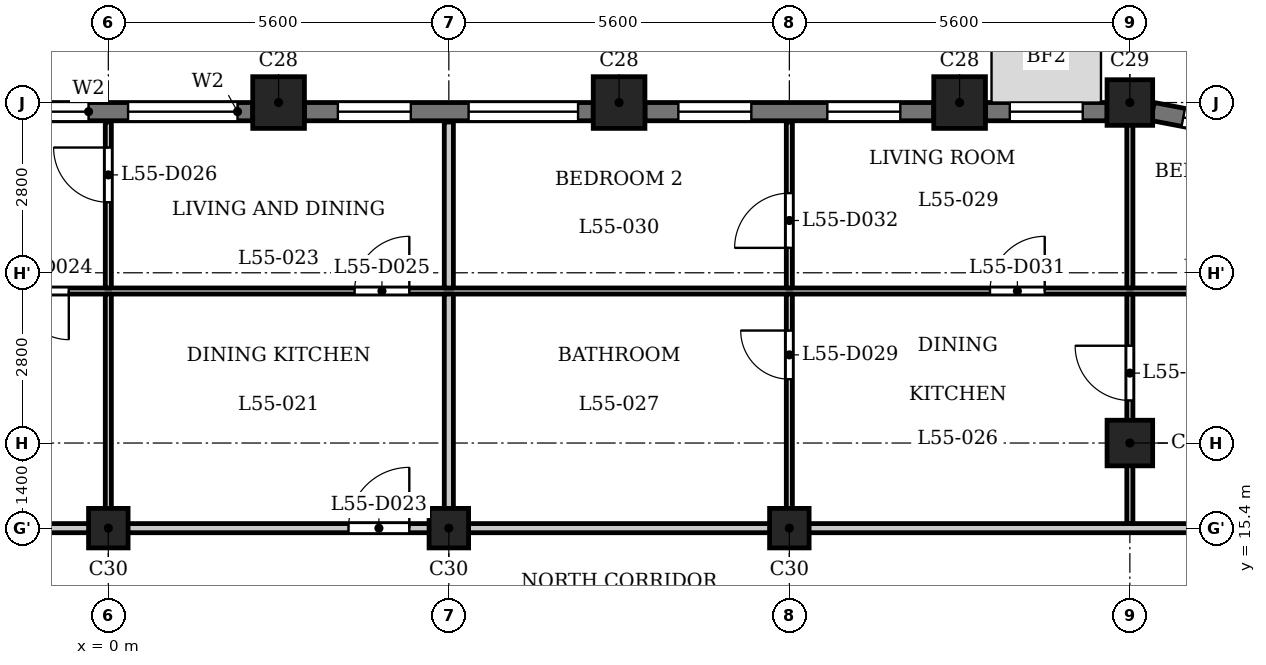
"""IFC4 building model, lengths in metres.
Left out: names, types, materials, properties, quantities, classifications, styles, units other than length and angle.
Written with IfcOpenShell. Run it as: python <this file> out.ifc"""

import sys

from ifc_helpers import new_model, si_unit, direction, frame, frame_2d, origin, origin_2d, place, context, subcontext, project, spatial, rectangle, extrude, element, fill, save


model = new_model("IFC4")
c1 = context("Model", 3, precision=1e-05, world=origin(), true_north=direction((0.0, 1.0)))
c2 = subcontext(c1, "Body", "Model", "MODEL_VIEW")
j1 = project(units=[si_unit("LENGTHUNIT", "METRE"), si_unit("PLANEANGLEUNIT", "RADIAN")], contexts=[c1])
p1 = place(None, origin())
s1 = spatial("IfcSite", under=j1, at=p1, CompositionType="ELEMENT")
p2 = place(p1, origin())
s2 = spatial("IfcBuilding", under=s1, at=p2, CompositionType="ELEMENT")
p3 = place(p2, frame((0.0, 0.0, 213.4)))
s3 = spatial("IfcBuildingStorey", under=s2, at=p3, CompositionType="ELEMENT", Elevation=213.4)
for number, where, z_axis, x_axis in (
    (1, (14.0, 22.4, 0.0), (0.0, 0.0, 1.0), (1.0, 0.0, 0.0)),
    (2, (8.4, 22.4, 0.0), (0.0, 0.0, 1.0), (1.0, 0.0, 0.0)),
    (3, (2.8, 22.4, 0.0), (0.0, 0.0, 1.0), (1.0, 0.0, 0.0)),
):
    element("IfcColumn", number, at=place(p3, frame(where, z_axis=z_axis, x_axis=x_axis)), inside=s3, PredefinedType="COLUMN", context=c2, shape_type="SweptSolid", body=[
        extrude(rectangle(XDim=0.85, YDim=0.85, at=origin_2d()), origin(), (0.0, 0.0, 1.0), 3.5),
    ])
for number, where, z_axis, x_axis in (
    (4, (16.8, 16.8, 0.0), (0.0, 0.0, 1.0), (1.0, 0.0, 0.0)),
    (5, (16.8, 22.4, 0.0), (0.0, 0.0, 1.0), (1.0, 0.0, 0.0)),
):
    element("IfcColumn", number, at=place(p3, frame(where, z_axis=z_axis, x_axis=x_axis)), inside=s3, PredefinedType="COLUMN", context=c2, shape_type="SweptSolid", body=[
        extrude(rectangle(XDim=0.75, YDim=0.75, at=origin_2d()), origin(), (0.0, 0.0, 1.0), 3.5),
    ])
for number, where, z_axis, x_axis in (
    (6, (0.0, 15.4, 0.0), (0.0, 0.0, 1.0), (1.0, 0.0, 0.0)),
    (7, (5.6, 15.4, 0.0), (0.0, 0.0, 1.0), (1.0, 0.0, 0.0)),
    (8, (11.2, 15.4, 0.0), (0.0, 0.0, 1.0), (1.0, 0.0, 0.0)),
):
    element("IfcColumn", number, at=place(p3, frame(where, z_axis=z_axis, x_axis=x_axis)), inside=s3, PredefinedType="COLUMN", context=c2, shape_type="SweptSolid", body=[
        extrude(rectangle(XDim=0.65, YDim=0.65, at=origin_2d()), origin(), (0.0, 0.0, 1.0), 3.5),
    ])
p4 = place(p3, frame((18.971, 21.91, 0.0), z_axis=(0.0, 0.0, 1.0), x_axis=(-0.982300037503, 0.187314271538, 0.0)))
e9 = element("IfcWall", 9, at=p4, inside=s3, PredefinedType="SOLIDWALL", context=c2, shape_type="SweptSolid", body=[
    extrude(rectangle(XDim=1.831, YDim=0.3, at=frame_2d((0.916, 0.0))), origin(), (0.0, 0.0, 1.0), 2.5),
])
p5 = place(p4, frame((0.516, 0.0, 0.6)))
e10 = element("IfcOpeningElement", 10, at=p5, cuts=e9, PredefinedType="OPENING", context=c2, shape_type="SweptSolid", body=[
    extrude(rectangle(XDim=0.8, YDim=1.55, at=frame_2d((0.4, 0.775))), frame((0.0, 0.16, 0.0), z_axis=(0.0, -1.0, 0.0), x_axis=(1.0, 0.0, 0.0)), (0.0, 0.0, 1.0), 0.32),
])
p6 = place(p3, frame((16.425, 22.25, 0.0), z_axis=(0.0, 0.0, 1.0), x_axis=(-1.0, 0.0, 0.0)))
e11 = element("IfcWall", 11, at=p6, inside=s3, PredefinedType="SOLIDWALL", context=c2, shape_type="SweptSolid", body=[
    extrude(rectangle(XDim=2.0, YDim=0.3, at=frame_2d((1.0, 0.0))), origin(), (0.0, 0.0, 1.0), 2.5),
])
p7 = place(p6, frame((0.4, 0.0, 0.6)))
e12 = element("IfcOpeningElement", 12, at=p7, cuts=e11, PredefinedType="OPENING", context=c2, shape_type="SweptSolid", body=[
    extrude(rectangle(XDim=1.2, YDim=1.55, at=frame_2d((0.6, 0.775))), frame((0.0, 0.16, 0.0), z_axis=(0.0, -1.0, 0.0), x_axis=(1.0, 0.0, 0.0)), (0.0, 0.0, 1.0), 0.32),
])
p8 = place(p3, frame((13.575, 22.25, 0.0), z_axis=(0.0, 0.0, 1.0), x_axis=(-1.0, 0.0, 0.0)))
e13 = element("IfcWall", 13, at=p8, inside=s3, PredefinedType="SOLIDWALL", context=c2, shape_type="SweptSolid", body=[
    extrude(rectangle(XDim=4.75, YDim=0.3, at=frame_2d((2.375, 0.0))), origin(), (0.0, 0.0, 1.0), 2.5),
])
p9 = place(p8, frame((0.55, 0.0, 0.6)))
e14 = element("IfcOpeningElement", 14, at=p9, cuts=e13, PredefinedType="OPENING", context=c2, shape_type="SweptSolid", body=[
    extrude(rectangle(XDim=1.2, YDim=1.55, at=frame_2d((0.6, 0.775))), frame((0.0, 0.16, 0.0), z_axis=(0.0, -1.0, 0.0), x_axis=(1.0, 0.0, 0.0)), (0.0, 0.0, 1.0), 0.32),
])
p10 = place(p8, frame((3.0, 0.0, 0.6)))
e15 = element("IfcOpeningElement", 15, at=p10, cuts=e13, PredefinedType="OPENING", context=c2, shape_type="SweptSolid", body=[
    extrude(rectangle(XDim=1.2, YDim=1.55, at=frame_2d((0.6, 0.775))), frame((0.0, 0.16, 0.0), z_axis=(0.0, -1.0, 0.0), x_axis=(1.0, 0.0, 0.0)), (0.0, 0.0, 1.0), 0.32),
])
p11 = place(p3, frame((7.975, 22.25, 0.0), z_axis=(0.0, 0.0, 1.0), x_axis=(-1.0, 0.0, 0.0)))
e16 = element("IfcWall", 16, at=p11, inside=s3, PredefinedType="SOLIDWALL", context=c2, shape_type="SweptSolid", body=[
    extrude(rectangle(XDim=4.75, YDim=0.3, at=frame_2d((2.375, 0.0))), origin(), (0.0, 0.0, 1.0), 2.5),
])
p12 = place(p11, frame((0.25, 0.0, 0.9)))
e17 = element("IfcOpeningElement", 17, at=p12, cuts=e16, PredefinedType="OPENING", context=c2, shape_type="SweptSolid", body=[
    extrude(rectangle(XDim=1.8, YDim=1.25, at=frame_2d((0.9, 0.625))), frame((0.0, 0.16, 0.0), z_axis=(0.0, -1.0, 0.0), x_axis=(1.0, 0.0, 0.0)), (0.0, 0.0, 1.0), 0.32),
])
p13 = place(p11, frame((3.0, 0.0, 0.6)))
e18 = element("IfcOpeningElement", 18, at=p13, cuts=e16, PredefinedType="OPENING", context=c2, shape_type="SweptSolid", body=[
    extrude(rectangle(XDim=1.2, YDim=1.55, at=frame_2d((0.6, 0.775))), frame((0.0, 0.16, 0.0), z_axis=(0.0, -1.0, 0.0), x_axis=(1.0, 0.0, 0.0)), (0.0, 0.0, 1.0), 0.32),
])
p14 = place(p3, frame((2.375, 22.25, 0.0), z_axis=(0.0, 0.0, 1.0), x_axis=(-1.0, 0.0, 0.0)))
e19 = element("IfcWall", 19, at=p14, inside=s3, PredefinedType="SOLIDWALL", context=c2, shape_type="SweptSolid", body=[
    extrude(rectangle(XDim=4.75, YDim=0.3, at=frame_2d((2.375, 0.0))), origin(), (0.0, 0.0, 1.0), 2.5),
])
p15 = place(p14, frame((0.25, 0.0, 0.9)))
e20 = element("IfcOpeningElement", 20, at=p15, cuts=e19, PredefinedType="OPENING", context=c2, shape_type="SweptSolid", body=[
    extrude(rectangle(XDim=1.8, YDim=1.25, at=frame_2d((0.9, 0.625))), frame((0.0, 0.16, 0.0), z_axis=(0.0, -1.0, 0.0), x_axis=(1.0, 0.0, 0.0)), (0.0, 0.0, 1.0), 0.32),
])
p16 = place(p14, frame((2.7, 0.0, 0.9)))
e21 = element("IfcOpeningElement", 21, at=p16, cuts=e19, PredefinedType="OPENING", context=c2, shape_type="SweptSolid", body=[
    extrude(rectangle(XDim=1.8, YDim=1.25, at=frame_2d((0.9, 0.625))), frame((0.0, 0.16, 0.0), z_axis=(0.0, -1.0, 0.0), x_axis=(1.0, 0.0, 0.0)), (0.0, 0.0, 1.0), 0.32),
])
p17 = place(p3, frame((-24.684, 15.4, 0.0), z_axis=(0.0, 0.0, 1.0), x_axis=(1.0, 0.0, 0.0)))
e22 = element("IfcWall", 22, at=p17, inside=s3, PredefinedType="PARTITIONING", context=c2, shape_type="SweptSolid", body=[
    extrude(rectangle(XDim=49.368, YDim=0.15, at=frame_2d((24.684, 0.0))), origin(), (0.0, 0.0, 1.0), 3.2),
])
p18 = place(p17, frame((17.434, 0.0, 0.0)))
e23 = element("IfcOpeningElement", 23, at=p18, cuts=e22, PredefinedType="OPENING", context=c2, shape_type="SweptSolid", body=[
    extrude(rectangle(XDim=1.0, YDim=2.1, at=frame_2d((0.5, 1.05))), frame((0.0, 0.085, 0.0), z_axis=(0.0, -1.0, 0.0), x_axis=(1.0, 0.0, 0.0)), (0.0, 0.0, 1.0), 0.17),
])
p19 = place(p17, frame((28.634, 0.0, 0.0)))
e24 = element("IfcOpeningElement", 24, at=p19, cuts=e22, PredefinedType="OPENING", context=c2, shape_type="SweptSolid", body=[
    extrude(rectangle(XDim=1.0, YDim=2.1, at=frame_2d((0.5, 1.05))), frame((0.0, 0.085, 0.0), z_axis=(0.0, -1.0, 0.0), x_axis=(1.0, 0.0, 0.0)), (0.0, 0.0, 1.0), 0.17),
])
p20 = place(p17, frame((47.225, 0.0, 0.0)))
e25 = element("IfcOpeningElement", 25, at=p20, cuts=e22, PredefinedType="OPENING", context=c2, shape_type="SweptSolid", body=[
    extrude(rectangle(XDim=1.0, YDim=2.1, at=frame_2d((0.5, 1.05))), frame((0.0, 0.085, 0.0), z_axis=(0.0, -1.0, 0.0), x_axis=(1.0, 0.0, 0.0)), (0.0, 0.0, 1.0), 0.17),
])
p21 = place(p3, frame((-22.256, 19.3, 0.0), z_axis=(0.0, 0.0, 1.0), x_axis=(1.0, 0.0, 0.0)))
e26 = element("IfcWall", 26, at=p21, inside=s3, PredefinedType="PARTITIONING", context=c2, shape_type="SweptSolid", body=[
    extrude(rectangle(XDim=44.511, YDim=0.1, at=frame_2d((22.256, 0.0))), origin(), (0.0, 0.0, 1.0), 3.2),
])
p22 = place(p21, frame((11.606, 0.0, 0.0)))
e27 = element("IfcOpeningElement", 27, at=p22, cuts=e26, PredefinedType="OPENING", context=c2, shape_type="SweptSolid", body=[
    extrude(rectangle(XDim=0.9, YDim=2.1, at=frame_2d((0.45, 1.05))), frame((0.0, 0.06, 0.0), z_axis=(0.0, -1.0, 0.0), x_axis=(1.0, 0.0, 0.0)), (0.0, 0.0, 1.0), 0.12),
])
p23 = place(p21, frame((9.506, 0.0, 0.0)))
e28 = element("IfcOpeningElement", 28, at=p23, cuts=e26, PredefinedType="OPENING", context=c2, shape_type="SweptSolid", body=[
    extrude(rectangle(XDim=0.9, YDim=2.1, at=frame_2d((0.45, 1.05))), frame((0.0, 0.06, 0.0), z_axis=(0.0, -1.0, 0.0), x_axis=(1.0, 0.0, 0.0)), (0.0, 0.0, 1.0), 0.12),
])
p24 = place(p21, frame((20.806, 0.0, 0.0)))
e29 = element("IfcOpeningElement", 29, at=p24, cuts=e26, PredefinedType="OPENING", context=c2, shape_type="SweptSolid", body=[
    extrude(rectangle(XDim=0.8, YDim=2.1, at=frame_2d((0.4, 1.05))), frame((0.0, 0.06, 0.0), z_axis=(0.0, -1.0, 0.0), x_axis=(1.0, 0.0, 0.0)), (0.0, 0.0, 1.0), 0.12),
])
p25 = place(p21, frame((26.306, 0.0, 0.0)))
e30 = element("IfcOpeningElement", 30, at=p25, cuts=e26, PredefinedType="OPENING", context=c2, shape_type="SweptSolid", body=[
    extrude(rectangle(XDim=0.9, YDim=2.1, at=frame_2d((0.45, 1.05))), frame((0.0, 0.06, 0.0), z_axis=(0.0, -1.0, 0.0), x_axis=(1.0, 0.0, 0.0)), (0.0, 0.0, 1.0), 0.12),
])
p26 = place(p21, frame((40.278, 0.0, 0.0)))
e31 = element("IfcOpeningElement", 31, at=p26, cuts=e26, PredefinedType="OPENING", context=c2, shape_type="SweptSolid", body=[
    extrude(rectangle(XDim=0.9, YDim=2.1, at=frame_2d((0.45, 1.05))), frame((0.0, 0.06, 0.0), z_axis=(0.0, -1.0, 0.0), x_axis=(1.0, 0.0, 0.0)), (0.0, 0.0, 1.0), 0.12),
])
p27 = place(p21, frame((36.756, 0.0, 0.0)))
e32 = element("IfcOpeningElement", 32, at=p27, cuts=e26, PredefinedType="OPENING", context=c2, shape_type="SweptSolid", body=[
    extrude(rectangle(XDim=0.9, YDim=2.1, at=frame_2d((0.45, 1.05))), frame((0.0, 0.06, 0.0), z_axis=(0.0, -1.0, 0.0), x_axis=(1.0, 0.0, 0.0)), (0.0, 0.0, 1.0), 0.12),
])
p28 = place(p3, frame((0.0, 15.475, 0.0), z_axis=(0.0, 0.0, 1.0), x_axis=(0.0, 1.0, 0.0)))
e33 = element("IfcWall", 33, at=p28, inside=s3, PredefinedType="PARTITIONING", context=c2, shape_type="SweptSolid", body=[
    extrude(rectangle(XDim=3.775, YDim=0.1, at=frame_2d((1.887, 0.0))), origin(), (0.0, 0.0, 1.0), 3.2),
])
p29 = place(p3, frame((0.0, 19.35, 0.0), z_axis=(0.0, 0.0, 1.0), x_axis=(0.0, 1.0, 0.0)))
e34 = element("IfcWall", 34, at=p29, inside=s3, PredefinedType="PARTITIONING", context=c2, shape_type="SweptSolid", body=[
    extrude(rectangle(XDim=2.73, YDim=0.1, at=frame_2d((1.365, 0.0))), origin(), (0.0, 0.0, 1.0), 3.2),
])
p30 = place(p29, frame((1.41, 0.0, 0.0)))
e35 = element("IfcOpeningElement", 35, at=p30, cuts=e34, PredefinedType="OPENING", context=c2, shape_type="SweptSolid", body=[
    extrude(rectangle(XDim=0.9, YDim=2.1, at=frame_2d((0.45, 1.05))), frame((0.0, 0.06, 0.0), z_axis=(0.0, -1.0, 0.0), x_axis=(1.0, 0.0, 0.0)), (0.0, 0.0, 1.0), 0.12),
])
p31 = place(p3, frame((5.6, 15.475, 0.0), z_axis=(0.0, 0.0, 1.0), x_axis=(0.0, 1.0, 0.0)))
e36 = element("IfcWall", 36, at=p31, inside=s3, PredefinedType="PARTITIONING", context=c2, shape_type="SweptSolid", body=[
    extrude(rectangle(XDim=3.775, YDim=0.15, at=frame_2d((1.887, 0.0))), origin(), (0.0, 0.0, 1.0), 3.2),
])
p32 = place(p3, frame((5.6, 19.35, 0.0), z_axis=(0.0, 0.0, 1.0), x_axis=(0.0, 1.0, 0.0)))
e37 = element("IfcWall", 37, at=p32, inside=s3, PredefinedType="PARTITIONING", context=c2, shape_type="SweptSolid", body=[
    extrude(rectangle(XDim=2.73, YDim=0.15, at=frame_2d((1.365, 0.0))), origin(), (0.0, 0.0, 1.0), 3.2),
])
p33 = place(p3, frame((11.2, 15.475, 0.0), z_axis=(0.0, 0.0, 1.0), x_axis=(0.0, 1.0, 0.0)))
e38 = element("IfcWall", 38, at=p33, inside=s3, PredefinedType="PARTITIONING", context=c2, shape_type="SweptSolid", body=[
    extrude(rectangle(XDim=3.775, YDim=0.1, at=frame_2d((1.887, 0.0))), origin(), (0.0, 0.0, 1.0), 3.2),
])
p34 = place(p33, frame((2.375, 0.0, 0.0)))
e39 = element("IfcOpeningElement", 39, at=p34, cuts=e38, PredefinedType="OPENING", context=c2, shape_type="SweptSolid", body=[
    extrude(rectangle(XDim=0.8, YDim=2.1, at=frame_2d((0.4, 1.05))), frame((0.0, 0.06, 0.0), z_axis=(0.0, -1.0, 0.0), x_axis=(1.0, 0.0, 0.0)), (0.0, 0.0, 1.0), 0.12),
])
p35 = place(p3, frame((11.2, 19.35, 0.0), z_axis=(0.0, 0.0, 1.0), x_axis=(0.0, 1.0, 0.0)))
e40 = element("IfcWall", 40, at=p35, inside=s3, PredefinedType="PARTITIONING", context=c2, shape_type="SweptSolid", body=[
    extrude(rectangle(XDim=2.73, YDim=0.1, at=frame_2d((1.365, 0.0))), origin(), (0.0, 0.0, 1.0), 3.2),
])
p36 = place(p35, frame((0.66, 0.0, 0.0)))
e41 = element("IfcOpeningElement", 41, at=p36, cuts=e40, PredefinedType="OPENING", context=c2, shape_type="SweptSolid", body=[
    extrude(rectangle(XDim=0.9, YDim=2.1, at=frame_2d((0.45, 1.05))), frame((0.0, 0.06, 0.0), z_axis=(0.0, -1.0, 0.0), x_axis=(1.0, 0.0, 0.0)), (0.0, 0.0, 1.0), 0.12),
])
p37 = place(p3, frame((16.8, 15.475, 0.0), z_axis=(0.0, 0.0, 1.0), x_axis=(0.0, 1.0, 0.0)))
e42 = element("IfcWall", 42, at=p37, inside=s3, PredefinedType="PARTITIONING", context=c2, shape_type="SweptSolid", body=[
    extrude(rectangle(XDim=3.775, YDim=0.1, at=frame_2d((1.887, 0.0))), origin(), (0.0, 0.0, 1.0), 2.55),
])
p38 = place(p37, frame((2.025, 0.0, 0.0)))
e43 = element("IfcOpeningElement", 43, at=p38, cuts=e42, PredefinedType="OPENING", context=c2, shape_type="SweptSolid", body=[
    extrude(rectangle(XDim=0.9, YDim=2.1, at=frame_2d((0.45, 1.05))), frame((0.0, 0.06, 0.0), z_axis=(0.0, -1.0, 0.0), x_axis=(1.0, 0.0, 0.0)), (0.0, 0.0, 1.0), 0.12),
])
p39 = place(p3, frame((16.8, 19.35, 0.0), z_axis=(0.0, 0.0, 1.0), x_axis=(0.0, 1.0, 0.0)))
e44 = element("IfcWall", 44, at=p39, inside=s3, PredefinedType="PARTITIONING", context=c2, shape_type="SweptSolid", body=[
    extrude(rectangle(XDim=2.96, YDim=0.1, at=frame_2d((1.48, 0.0))), origin(), (0.0, 0.0, 1.0), 2.55),
])
p40 = place(p19, origin())
e45 = element("IfcDoor", 45, at=p40, inside=s3, OperationType="SINGLE_SWING_LEFT", PredefinedType="DOOR", context=c2, shape_type="SweptSolid", body=[
    extrude(rectangle(XDim=1.0, YDim=2.1, at=frame_2d((0.5, 1.05))), frame((0.0, 0.025, 0.0), z_axis=(0.0, -1.0, 0.0), x_axis=(1.0, 0.0, 0.0)), (0.0, 0.0, 1.0), 0.05),
])
fill(e24, e45)
p41 = place(p24, origin())
e46 = element("IfcDoor", 46, at=p41, inside=s3, OperationType="SINGLE_SWING_RIGHT", PredefinedType="DOOR", context=c2, shape_type="SweptSolid", body=[
    extrude(rectangle(XDim=0.8, YDim=2.1, at=frame_2d((0.4, 1.05))), frame((0.0, 0.025, 0.0), z_axis=(0.0, -1.0, 0.0), x_axis=(1.0, 0.0, 0.0)), (0.0, 0.0, 1.0), 0.05),
])
fill(e29, e46)
p42 = place(p25, origin())
e47 = element("IfcDoor", 47, at=p42, inside=s3, OperationType="SINGLE_SWING_LEFT", PredefinedType="DOOR", context=c2, shape_type="SweptSolid", body=[
    extrude(rectangle(XDim=0.9, YDim=2.1, at=frame_2d((0.45, 1.05))), frame((0.0, 0.025, 0.0), z_axis=(0.0, -1.0, 0.0), x_axis=(1.0, 0.0, 0.0)), (0.0, 0.0, 1.0), 0.05),
])
fill(e30, e47)
p43 = place(p30, origin())
e48 = element("IfcDoor", 48, at=p43, inside=s3, OperationType="SINGLE_SWING_LEFT", PredefinedType="DOOR", context=c2, shape_type="SweptSolid", body=[
    extrude(rectangle(XDim=0.9, YDim=2.1, at=frame_2d((0.45, 1.05))), frame((0.0, 0.025, 0.0), z_axis=(0.0, -1.0, 0.0), x_axis=(1.0, 0.0, 0.0)), (0.0, 0.0, 1.0), 0.05),
])
fill(e35, e48)
p44 = place(p38, origin())
e49 = element("IfcDoor", 49, at=p44, inside=s3, OperationType="SINGLE_SWING_LEFT", PredefinedType="DOOR", context=c2, shape_type="SweptSolid", body=[
    extrude(rectangle(XDim=0.9, YDim=2.1, at=frame_2d((0.45, 1.05))), frame((0.0, 0.025, 0.0), z_axis=(0.0, -1.0, 0.0), x_axis=(1.0, 0.0, 0.0)), (0.0, 0.0, 1.0), 0.05),
])
fill(e43, e49)
p45 = place(p34, origin())
e50 = element("IfcDoor", 50, at=p45, inside=s3, OperationType="SINGLE_SWING_LEFT", PredefinedType="DOOR", context=c2, shape_type="SweptSolid", body=[
    extrude(rectangle(XDim=0.8, YDim=2.1, at=frame_2d((0.4, 1.05))), frame((0.0, 0.025, 0.0), z_axis=(0.0, -1.0, 0.0), x_axis=(1.0, 0.0, 0.0)), (0.0, 0.0, 1.0), 0.05),
])
fill(e39, e50)
p46 = place(p27, origin())
e51 = element("IfcDoor", 51, at=p46, inside=s3, OperationType="SINGLE_SWING_LEFT", PredefinedType="DOOR", context=c2, shape_type="SweptSolid", body=[
    extrude(rectangle(XDim=0.9, YDim=2.1, at=frame_2d((0.45, 1.05))), frame((0.0, 0.025, 0.0), z_axis=(0.0, -1.0, 0.0), x_axis=(1.0, 0.0, 0.0)), (0.0, 0.0, 1.0), 0.05),
])
fill(e32, e51)
p47 = place(p36, origin())
e52 = element("IfcDoor", 52, at=p47, inside=s3, OperationType="SINGLE_SWING_RIGHT", PredefinedType="DOOR", context=c2, shape_type="SweptSolid", body=[
    extrude(rectangle(XDim=0.9, YDim=2.1, at=frame_2d((0.45, 1.05))), frame((0.0, 0.025, 0.0), z_axis=(0.0, -1.0, 0.0), x_axis=(1.0, 0.0, 0.0)), (0.0, 0.0, 1.0), 0.05),
])
fill(e41, e52)
p48 = place(p5, origin())
e53 = element("IfcWindow", 53, at=p48, inside=s3, PartitioningType="SINGLE_PANEL", PredefinedType="WINDOW", context=c2, shape_type="SweptSolid", body=[
    extrude(rectangle(XDim=0.8, YDim=1.55, at=frame_2d((0.4, 0.775))), frame((0.0, 0.03, 0.0), z_axis=(0.0, -1.0, 0.0), x_axis=(1.0, 0.0, 0.0)), (0.0, 0.0, 1.0), 0.06),
])
fill(e10, e53)
p49 = place(p7, origin())
e54 = element("IfcWindow", 54, at=p49, inside=s3, PartitioningType="SINGLE_PANEL", PredefinedType="WINDOW", context=c2, shape_type="SweptSolid", body=[
    extrude(rectangle(XDim=1.2, YDim=1.55, at=frame_2d((0.6, 0.775))), frame((0.0, 0.03, 0.0), z_axis=(0.0, -1.0, 0.0), x_axis=(1.0, 0.0, 0.0)), (0.0, 0.0, 1.0), 0.06),
])
fill(e12, e54)
p50 = place(p9, origin())
e55 = element("IfcWindow", 55, at=p50, inside=s3, PartitioningType="SINGLE_PANEL", PredefinedType="WINDOW", context=c2, shape_type="SweptSolid", body=[
    extrude(rectangle(XDim=1.2, YDim=1.55, at=frame_2d((0.6, 0.775))), frame((0.0, 0.03, 0.0), z_axis=(0.0, -1.0, 0.0), x_axis=(1.0, 0.0, 0.0)), (0.0, 0.0, 1.0), 0.06),
])
fill(e14, e55)
p51 = place(p10, origin())
e56 = element("IfcWindow", 56, at=p51, inside=s3, PartitioningType="SINGLE_PANEL", PredefinedType="WINDOW", context=c2, shape_type="SweptSolid", body=[
    extrude(rectangle(XDim=1.2, YDim=1.55, at=frame_2d((0.6, 0.775))), frame((0.0, 0.03, 0.0), z_axis=(0.0, -1.0, 0.0), x_axis=(1.0, 0.0, 0.0)), (0.0, 0.0, 1.0), 0.06),
])
fill(e15, e56)
p52 = place(p12, origin())
e57 = element("IfcWindow", 57, at=p52, inside=s3, PartitioningType="SINGLE_PANEL", PredefinedType="WINDOW", context=c2, shape_type="SweptSolid", body=[
    extrude(rectangle(XDim=1.8, YDim=1.25, at=frame_2d((0.9, 0.625))), frame((0.0, 0.03, 0.0), z_axis=(0.0, -1.0, 0.0), x_axis=(1.0, 0.0, 0.0)), (0.0, 0.0, 1.0), 0.06),
])
fill(e17, e57)
p53 = place(p13, origin())
e58 = element("IfcWindow", 58, at=p53, inside=s3, PartitioningType="SINGLE_PANEL", PredefinedType="WINDOW", context=c2, shape_type="SweptSolid", body=[
    extrude(rectangle(XDim=1.2, YDim=1.55, at=frame_2d((0.6, 0.775))), frame((0.0, 0.03, 0.0), z_axis=(0.0, -1.0, 0.0), x_axis=(1.0, 0.0, 0.0)), (0.0, 0.0, 1.0), 0.06),
])
fill(e18, e58)
p54 = place(p15, origin())
e59 = element("IfcWindow", 59, at=p54, inside=s3, PartitioningType="SINGLE_PANEL", PredefinedType="WINDOW", context=c2, shape_type="SweptSolid", body=[
    extrude(rectangle(XDim=1.8, YDim=1.25, at=frame_2d((0.9, 0.625))), frame((0.0, 0.03, 0.0), z_axis=(0.0, -1.0, 0.0), x_axis=(1.0, 0.0, 0.0)), (0.0, 0.0, 1.0), 0.06),
])
fill(e20, e59)
p55 = place(p16, origin())
e60 = element("IfcWindow", 60, at=p55, inside=s3, PartitioningType="SINGLE_PANEL", PredefinedType="WINDOW", context=c2, shape_type="SweptSolid", body=[
    extrude(rectangle(XDim=1.8, YDim=1.25, at=frame_2d((0.9, 0.625))), frame((0.0, 0.03, 0.0), z_axis=(0.0, -1.0, 0.0), x_axis=(1.0, 0.0, 0.0)), (0.0, 0.0, 1.0), 0.06),
])
fill(e21, e60)
save(model, sys.argv[1])
